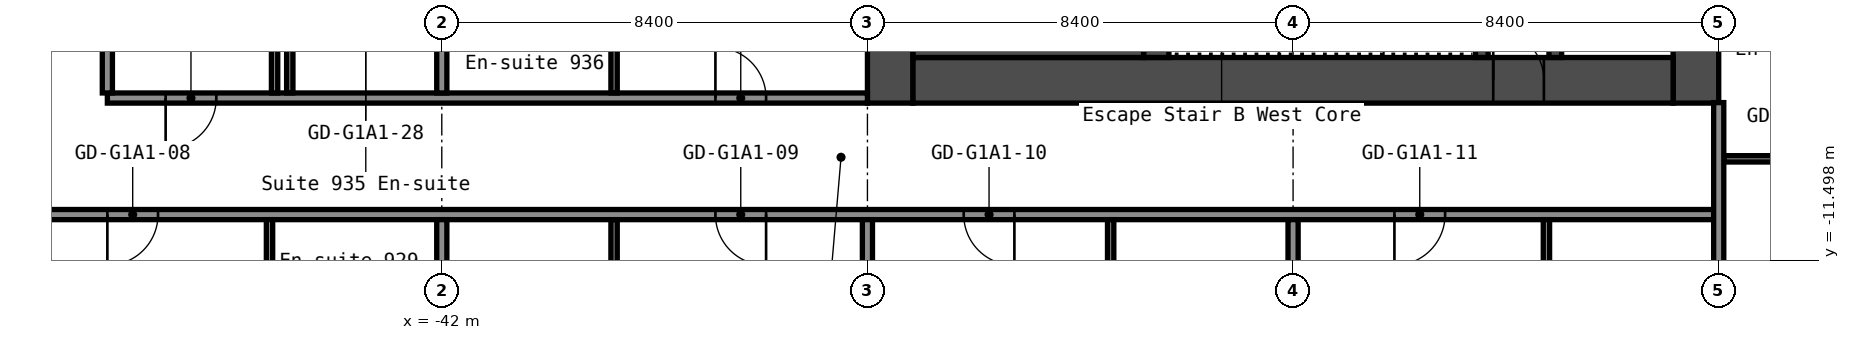
"""IFC4 building model, lengths in metres.
Left out: names, types, materials, properties, quantities, classifications, styles, units other than length and angle.
Written with IfcOpenShell. Run it as: python <this file> out.ifc"""

import sys

from ifc_helpers import new_model, si_unit, direction, frame, frame_2d, origin, place, context, subcontext, project, spatial, rectangle, extrude, element, fill, save


model = new_model("IFC4")
c1 = context("Model", 3, precision=1e-05, world=origin(), true_north=direction((0.0, 1.0)))
c2 = subcontext(c1, "Body", "Model", "MODEL_VIEW")
j1 = project(units=[si_unit("LENGTHUNIT", "METRE"), si_unit("PLANEANGLEUNIT", "RADIAN")], contexts=[c1])
p1 = place(None, origin())
s1 = spatial("IfcSite", under=j1, at=p1, CompositionType="ELEMENT")
p2 = place(p1, origin())
s2 = spatial("IfcBuilding", under=s1, at=p2, CompositionType="ELEMENT")
p3 = place(p2, frame((0.0, 0.0, 35.8)))
s3 = spatial("IfcBuildingStorey", under=s2, at=p3, CompositionType="ELEMENT", Elevation=35.8)
p4 = place(p3, frame((-17.25, -8.4, 0.0), z_axis=(0.0, 0.0, 1.0), x_axis=(0.0, 1.0, 0.0)))
e1 = element("IfcWall", 1, at=p4, inside=s3, PredefinedType="SHEAR", context=c2, shape_type="SweptSolid", body=[
    extrude(rectangle(XDim=16.8, YDim=0.9, at=frame_2d((8.4, 0.0))), origin(), (0.0, 0.0, 1.0), 2.8),
])
p5 = place(p4, frame((12.75, 0.0, 0.0)))
e2 = element("IfcOpeningElement", 2, at=p5, cuts=e1, PredefinedType="OPENING", context=c2, shape_type="SweptSolid", body=[
    extrude(rectangle(XDim=1.2, YDim=2.1, at=frame_2d((0.6, 1.05))), frame((0.0, 0.46, 0.0), z_axis=(0.0, -1.0, 0.0), x_axis=(1.0, 0.0, 0.0)), (0.0, 0.0, 1.0), 0.92),
])
p6 = place(p4, frame((2.85, 0.0, 0.0)))
e3 = element("IfcOpeningElement", 3, at=p6, cuts=e1, PredefinedType="OPENING", context=c2, shape_type="SweptSolid", body=[
    extrude(rectangle(XDim=1.2, YDim=2.1, at=frame_2d((0.6, 1.05))), frame((0.0, 0.46, 0.0), z_axis=(0.0, -1.0, 0.0), x_axis=(1.0, 0.0, 0.0)), (0.0, 0.0, 1.0), 0.92),
])
p7 = place(p3, frame((-33.15, -8.4, 0.0), z_axis=(0.0, 0.0, 1.0), x_axis=(0.0, 1.0, 0.0)))
e4 = element("IfcWall", 4, at=p7, inside=s3, PredefinedType="SHEAR", context=c2, shape_type="SweptSolid", body=[
    extrude(rectangle(XDim=16.8, YDim=0.9, at=frame_2d((8.4, 0.0))), origin(), (0.0, 0.0, 1.0), 2.8),
])
p8 = place(p3, frame((-32.7, -7.95, 0.0), z_axis=(0.0, 0.0, 1.0), x_axis=(1.0, 0.0, 0.0)))
e5 = element("IfcWall", 5, at=p8, inside=s3, PredefinedType="SHEAR", context=c2, shape_type="SweptSolid", body=[
    extrude(rectangle(XDim=15.0, YDim=0.9, at=frame_2d((7.5, 0.0))), origin(), (0.0, 0.0, 1.0), 2.8),
])
p9 = place(p8, frame((11.45, 0.0, 0.0)))
e6 = element("IfcOpeningElement", 6, at=p9, cuts=e5, PredefinedType="OPENING", context=c2, shape_type="SweptSolid", body=[
    extrude(rectangle(XDim=1.0, YDim=2.1, at=frame_2d((0.5, 1.05))), frame((0.0, 0.46, 0.0), z_axis=(0.0, -1.0, 0.0), x_axis=(1.0, 0.0, 0.0)), (0.0, 0.0, 1.0), 0.92),
])
p10 = place(p3, frame((-20.025, -7.5, 0.0), z_axis=(0.0, 0.0, 1.0), x_axis=(0.0, 1.0, 0.0)))
e7 = element("IfcWall", 7, at=p10, inside=s3, PredefinedType="SHEAR", context=c2, shape_type="SweptSolid", body=[
    extrude(rectangle(XDim=6.3, YDim=0.25, at=frame_2d((3.15, 0.0))), origin(), (0.0, 0.0, 1.0), 2.8),
])
p11 = place(p10, frame((2.4, 0.0, 0.0)))
e8 = element("IfcOpeningElement", 8, at=p11, cuts=e7, PredefinedType="OPENING", context=c2, shape_type="SweptSolid", body=[
    extrude(rectangle(XDim=1.0, YDim=2.1, at=frame_2d((0.5, 1.05))), frame((0.0, 0.135, 0.0), z_axis=(0.0, -1.0, 0.0), x_axis=(1.0, 0.0, 0.0)), (0.0, 0.0, 1.0), 0.27),
])
p12 = place(p3, frame((-21.475, -7.5, 0.0), z_axis=(0.0, 0.0, 1.0), x_axis=(0.0, 1.0, 0.0)))
e9 = element("IfcWall", 9, at=p12, inside=s3, PredefinedType="SHEAR", context=c2, shape_type="SweptSolid", body=[
    extrude(rectangle(XDim=3.75, YDim=0.25, at=frame_2d((1.875, 0.0))), origin(), (0.0, 0.0, 1.0), 2.8),
])
p13 = place(p12, frame((1.3, 0.0, 0.0)))
e10 = element("IfcOpeningElement", 10, at=p13, cuts=e9, PredefinedType="OPENING", context=c2, shape_type="SweptSolid", body=[
    extrude(rectangle(XDim=1.2, YDim=2.1, at=frame_2d((0.6, 1.05))), frame((0.0, 0.135, 0.0), z_axis=(0.0, -1.0, 0.0), x_axis=(1.0, 0.0, 0.0)), (0.0, 0.0, 1.0), 0.27),
])
p14 = place(p3, frame((-27.9, -7.5, 0.0), z_axis=(0.0, 0.0, 1.0), x_axis=(0.0, 1.0, 0.0)))
e11 = element("IfcWall", 11, at=p14, inside=s3, PredefinedType="SHEAR", context=c2, shape_type="SweptSolid", body=[
    extrude(rectangle(XDim=3.75, YDim=0.5, at=frame_2d((1.875, 0.0))), origin(), (0.0, 0.0, 1.0), 2.8),
])
p15 = place(p3, frame((-32.7, -6.75, 0.0), z_axis=(0.0, 0.0, 1.0), x_axis=(1.0, 0.0, 0.0)))
e12 = element("IfcWall", 12, at=p15, inside=s3, PredefinedType="SHEAR", context=c2, shape_type="SweptSolid", body=[
    extrude(rectangle(XDim=4.55, YDim=1.5, at=frame_2d((2.275, 0.0))), origin(), (0.0, 0.0, 1.0), 2.8),
])
p16 = place(p3, frame((-51.1, -10.6, 0.0), z_axis=(0.0, 0.0, 1.0), x_axis=(1.0, 0.0, 0.0)))
e13 = element("IfcWall", 13, at=p16, inside=s3, PredefinedType="PARTITIONING", context=c2, shape_type="SweptSolid", body=[
    extrude(rectangle(XDim=34.3, YDim=0.2, at=frame_2d((17.15, 0.0))), origin(), (0.0, 0.0, 1.0), 2.8),
])
p17 = place(p16, frame((2.5, 0.0, 0.0)))
e14 = element("IfcOpeningElement", 14, at=p17, cuts=e13, PredefinedType="OPENING", context=c2, shape_type="SweptSolid", body=[
    extrude(rectangle(XDim=1.0, YDim=2.1, at=frame_2d((0.5, 1.05))), frame((0.0, 0.11, 0.0), z_axis=(0.0, -1.0, 0.0), x_axis=(1.0, 0.0, 0.0)), (0.0, 0.0, 1.0), 0.22),
])
p18 = place(p16, frame((14.5, 0.0, 0.0)))
e15 = element("IfcOpeningElement", 15, at=p18, cuts=e13, PredefinedType="OPENING", context=c2, shape_type="SweptSolid", body=[
    extrude(rectangle(XDim=1.0, YDim=2.1, at=frame_2d((0.5, 1.05))), frame((0.0, 0.11, 0.0), z_axis=(0.0, -1.0, 0.0), x_axis=(1.0, 0.0, 0.0)), (0.0, 0.0, 1.0), 0.22),
])
p19 = place(p16, frame((19.4, 0.0, 0.0)))
e16 = element("IfcOpeningElement", 16, at=p19, cuts=e13, PredefinedType="OPENING", context=c2, shape_type="SweptSolid", body=[
    extrude(rectangle(XDim=1.0, YDim=2.1, at=frame_2d((0.5, 1.05))), frame((0.0, 0.11, 0.0), z_axis=(0.0, -1.0, 0.0), x_axis=(1.0, 0.0, 0.0)), (0.0, 0.0, 1.0), 0.22),
])
p20 = place(p16, frame((27.9, 0.0, 0.0)))
e17 = element("IfcOpeningElement", 17, at=p20, cuts=e13, PredefinedType="OPENING", context=c2, shape_type="SweptSolid", body=[
    extrude(rectangle(XDim=1.0, YDim=2.1, at=frame_2d((0.5, 1.05))), frame((0.0, 0.11, 0.0), z_axis=(0.0, -1.0, 0.0), x_axis=(1.0, 0.0, 0.0)), (0.0, 0.0, 1.0), 0.22),
])
p21 = place(p3, frame((-16.7, -9.5, 0.0), z_axis=(0.0, 0.0, 1.0), x_axis=(1.0, 0.0, 0.0)))
e18 = element("IfcWall", 18, at=p21, inside=s3, PredefinedType="PARTITIONING", context=c2, shape_type="SweptSolid", body=[
    extrude(rectangle(XDim=3.238, YDim=0.125, at=frame_2d((1.619, 0.0))), origin(), (0.0, 0.0, 1.0), 2.8),
])
p22 = place(p21, frame((1.2, 0.0, 0.0)))
e19 = element("IfcOpeningElement", 19, at=p22, cuts=e18, PredefinedType="OPENING", context=c2, shape_type="SweptSolid", body=[
    extrude(rectangle(XDim=0.8, YDim=2.1, at=frame_2d((0.4, 1.05))), frame((0.0, 0.073, 0.0), z_axis=(0.0, -1.0, 0.0), x_axis=(1.0, 0.0, 0.0)), (0.0, 0.0, 1.0), 0.145),
])
p23 = place(p3, frame((-48.6, -8.3, 0.0), z_axis=(0.0, 0.0, 1.0), x_axis=(1.0, 0.0, 0.0)))
e20 = element("IfcWall", 20, at=p23, inside=s3, PredefinedType="PARTITIONING", context=c2, shape_type="SweptSolid", body=[
    extrude(rectangle(XDim=15.0, YDim=0.2, at=frame_2d((7.5, 0.0))), origin(), (0.0, 0.0, 1.0), 2.8),
])
p24 = place(p23, frame((1.15, 0.0, 0.0)))
e21 = element("IfcOpeningElement", 21, at=p24, cuts=e20, PredefinedType="OPENING", context=c2, shape_type="SweptSolid", body=[
    extrude(rectangle(XDim=1.0, YDim=2.1, at=frame_2d((0.5, 1.05))), frame((0.0, 0.11, 0.0), z_axis=(0.0, -1.0, 0.0), x_axis=(1.0, 0.0, 0.0)), (0.0, 0.0, 1.0), 0.22),
])
p25 = place(p23, frame((12.0, 0.0, 0.0)))
e22 = element("IfcOpeningElement", 22, at=p25, cuts=e20, PredefinedType="OPENING", context=c2, shape_type="SweptSolid", body=[
    extrude(rectangle(XDim=1.0, YDim=2.1, at=frame_2d((0.5, 1.05))), frame((0.0, 0.11, 0.0), z_axis=(0.0, -1.0, 0.0), x_axis=(1.0, 0.0, 0.0)), (0.0, 0.0, 1.0), 0.22),
])
p26 = place(p3, frame((-48.6, -8.2, 0.0), z_axis=(0.0, 0.0, 1.0), x_axis=(0.0, 1.0, 0.0)))
e23 = element("IfcWall", 23, at=p26, inside=s3, PredefinedType="PARTITIONING", context=c2, shape_type="SweptSolid", body=[
    extrude(rectangle(XDim=16.4, YDim=0.2, at=frame_2d((8.2, 0.0))), origin(), (0.0, 0.0, 1.0), 2.8),
])
p27 = place(p3, frame((-45.4, -14.0, 0.0), z_axis=(0.0, 0.0, 1.0), x_axis=(0.0, 1.0, 0.0)))
e24 = element("IfcWall", 24, at=p27, inside=s3, PredefinedType="PARTITIONING", context=c2, shape_type="SweptSolid", body=[
    extrude(rectangle(XDim=3.3, YDim=0.125, at=frame_2d((1.65, 0.0))), origin(), (0.0, 0.0, 1.0), 2.8),
])
p28 = place(p3, frame((-45.3, -8.2, 0.0), z_axis=(0.0, 0.0, 1.0), x_axis=(0.0, 1.0, 0.0)))
e25 = element("IfcWall", 25, at=p28, inside=s3, PredefinedType="PARTITIONING", context=c2, shape_type="SweptSolid", body=[
    extrude(rectangle(XDim=8.1, YDim=0.125, at=frame_2d((4.05, 0.0))), origin(), (0.0, 0.0, 1.0), 2.8),
])
p29 = place(p28, frame((4.05, 0.0, 0.0)))
e26 = element("IfcOpeningElement", 26, at=p29, cuts=e25, PredefinedType="OPENING", context=c2, shape_type="SweptSolid", body=[
    extrude(rectangle(XDim=0.9, YDim=2.1, at=frame_2d((0.45, 1.05))), frame((0.0, 0.073, 0.0), z_axis=(0.0, -1.0, 0.0), x_axis=(1.0, 0.0, 0.0)), (0.0, 0.0, 1.0), 0.145),
])
p30 = place(p3, frame((-45.0, -8.2, 0.0), z_axis=(0.0, 0.0, 1.0), x_axis=(0.0, 1.0, 0.0)))
e27 = element("IfcWall", 27, at=p30, inside=s3, PredefinedType="PARTITIONING", context=c2, shape_type="SweptSolid", body=[
    extrude(rectangle(XDim=3.1, YDim=0.125, at=frame_2d((1.55, 0.0))), origin(), (0.0, 0.0, 1.0), 2.8),
])
p31 = place(p3, frame((-42.0, -20.3, 0.0), z_axis=(0.0, 0.0, 1.0), x_axis=(0.0, 1.0, 0.0)))
e28 = element("IfcWall", 28, at=p31, inside=s3, PredefinedType="PARTITIONING", context=c2, shape_type="SweptSolid", body=[
    extrude(rectangle(XDim=9.6, YDim=0.2, at=frame_2d((4.8, 0.0))), origin(), (0.0, 0.0, 1.0), 2.8),
])
p32 = place(p3, frame((-42.0, -8.2, 0.0), z_axis=(0.0, 0.0, 1.0), x_axis=(0.0, 1.0, 0.0)))
e29 = element("IfcWall", 29, at=p32, inside=s3, PredefinedType="PARTITIONING", context=c2, shape_type="SweptSolid", body=[
    extrude(rectangle(XDim=16.4, YDim=0.2, at=frame_2d((8.2, 0.0))), origin(), (0.0, 0.0, 1.0), 2.8),
])
for number, where, z_axis, x_axis in (
    (30, (-38.6, -14.0, 0.0), (0.0, 0.0, 1.0), (0.0, 1.0, 0.0)),
    (31, (-38.6, -8.2, 0.0), (0.0, 0.0, 1.0), (0.0, 1.0, 0.0)),
):
    element("IfcWall", number, at=place(p3, frame(where, z_axis=z_axis, x_axis=x_axis)), inside=s3, PredefinedType="PARTITIONING", context=c2, shape_type="SweptSolid", body=[
        extrude(rectangle(XDim=3.3, YDim=0.125, at=frame_2d((1.65, 0.0))), origin(), (0.0, 0.0, 1.0), 2.8),
    ])
p33 = place(p3, frame((-33.6, -20.3, 0.0), z_axis=(0.0, 0.0, 1.0), x_axis=(0.0, 1.0, 0.0)))
e32 = element("IfcWall", 32, at=p33, inside=s3, PredefinedType="PARTITIONING", context=c2, shape_type="SweptSolid", body=[
    extrude(rectangle(XDim=9.6, YDim=0.2, at=frame_2d((4.8, 0.0))), origin(), (0.0, 0.0, 1.0), 2.8),
])
p34 = place(p3, frame((-28.8, -14.0, 0.0), z_axis=(0.0, 0.0, 1.0), x_axis=(0.0, 1.0, 0.0)))
e33 = element("IfcWall", 33, at=p34, inside=s3, PredefinedType="PARTITIONING", context=c2, shape_type="SweptSolid", body=[
    extrude(rectangle(XDim=3.3, YDim=0.125, at=frame_2d((1.65, 0.0))), origin(), (0.0, 0.0, 1.0), 2.8),
])
p35 = place(p34, frame((1.2, 0.0, 0.0)))
e34 = element("IfcOpeningElement", 34, at=p35, cuts=e33, PredefinedType="OPENING", context=c2, shape_type="SweptSolid", body=[
    extrude(rectangle(XDim=1.0, YDim=2.1, at=frame_2d((0.5, 1.05))), frame((0.0, 0.073, 0.0), z_axis=(0.0, -1.0, 0.0), x_axis=(1.0, 0.0, 0.0)), (0.0, 0.0, 1.0), 0.145),
])
p36 = place(p3, frame((-25.2, -20.3, 0.0), z_axis=(0.0, 0.0, 1.0), x_axis=(0.0, 1.0, 0.0)))
e35 = element("IfcWall", 35, at=p36, inside=s3, PredefinedType="PARTITIONING", context=c2, shape_type="SweptSolid", body=[
    extrude(rectangle(XDim=9.6, YDim=0.2, at=frame_2d((4.8, 0.0))), origin(), (0.0, 0.0, 1.0), 2.8),
])
p37 = place(p3, frame((-20.2, -14.0, 0.0), z_axis=(0.0, 0.0, 1.0), x_axis=(0.0, 1.0, 0.0)))
e36 = element("IfcWall", 36, at=p37, inside=s3, PredefinedType="PARTITIONING", context=c2, shape_type="SweptSolid", body=[
    extrude(rectangle(XDim=3.3, YDim=0.125, at=frame_2d((1.65, 0.0))), origin(), (0.0, 0.0, 1.0), 2.8),
])
p38 = place(p3, frame((-16.8, -20.3, 0.0), z_axis=(0.0, 0.0, 1.0), x_axis=(0.0, 1.0, 0.0)))
e37 = element("IfcWall", 37, at=p38, inside=s3, PredefinedType="PARTITIONING", context=c2, shape_type="SweptSolid", body=[
    extrude(rectangle(XDim=11.91, YDim=0.2, at=frame_2d((5.955, 0.0))), origin(), (0.0, 0.0, 1.0), 2.8),
])
p39 = place(p9, origin())
e38 = element("IfcDoor", 38, at=p39, inside=s3, OperationType="SINGLE_SWING_RIGHT", PredefinedType="DOOR", context=c2, shape_type="SweptSolid", body=[
    extrude(rectangle(XDim=1.0, YDim=2.1, at=frame_2d((0.5, 1.05))), frame((0.0, 0.025, 0.0), z_axis=(0.0, -1.0, 0.0), x_axis=(1.0, 0.0, 0.0)), (0.0, 0.0, 1.0), 0.05),
])
fill(e6, e38)
p40 = place(p17, origin())
e39 = element("IfcDoor", 39, at=p40, inside=s3, OperationType="SINGLE_SWING_LEFT", PredefinedType="DOOR", context=c2, shape_type="SweptSolid", body=[
    extrude(rectangle(XDim=1.0, YDim=2.1, at=frame_2d((0.5, 1.05))), frame((0.0, 0.025, 0.0), z_axis=(0.0, -1.0, 0.0), x_axis=(1.0, 0.0, 0.0)), (0.0, 0.0, 1.0), 0.05),
])
fill(e14, e39)
p41 = place(p18, origin())
e40 = element("IfcDoor", 40, at=p41, inside=s3, OperationType="SINGLE_SWING_RIGHT", PredefinedType="DOOR", context=c2, shape_type="SweptSolid", body=[
    extrude(rectangle(XDim=1.0, YDim=2.1, at=frame_2d((0.5, 1.05))), frame((0.0, 0.025, 0.0), z_axis=(0.0, -1.0, 0.0), x_axis=(1.0, 0.0, 0.0)), (0.0, 0.0, 1.0), 0.05),
])
fill(e15, e40)
p42 = place(p19, origin())
e41 = element("IfcDoor", 41, at=p42, inside=s3, OperationType="SINGLE_SWING_RIGHT", PredefinedType="DOOR", context=c2, shape_type="SweptSolid", body=[
    extrude(rectangle(XDim=1.0, YDim=2.1, at=frame_2d((0.5, 1.05))), frame((0.0, 0.025, 0.0), z_axis=(0.0, -1.0, 0.0), x_axis=(1.0, 0.0, 0.0)), (0.0, 0.0, 1.0), 0.05),
])
fill(e16, e41)
p43 = place(p20, origin())
e42 = element("IfcDoor", 42, at=p43, inside=s3, OperationType="SINGLE_SWING_LEFT", PredefinedType="DOOR", context=c2, shape_type="SweptSolid", body=[
    extrude(rectangle(XDim=1.0, YDim=2.1, at=frame_2d((0.5, 1.05))), frame((0.0, 0.025, 0.0), z_axis=(0.0, -1.0, 0.0), x_axis=(1.0, 0.0, 0.0)), (0.0, 0.0, 1.0), 0.05),
])
fill(e17, e42)
p44 = place(p24, origin())
e43 = element("IfcDoor", 43, at=p44, inside=s3, OperationType="SINGLE_SWING_LEFT", PredefinedType="DOOR", context=c2, shape_type="SweptSolid", body=[
    extrude(rectangle(XDim=1.0, YDim=2.1, at=frame_2d((0.5, 1.05))), frame((0.0, 0.025, 0.0), z_axis=(0.0, -1.0, 0.0), x_axis=(1.0, 0.0, 0.0)), (0.0, 0.0, 1.0), 0.05),
])
fill(e21, e43)
p45 = place(p25, origin())
e44 = element("IfcDoor", 44, at=p45, inside=s3, OperationType="SINGLE_SWING_RIGHT", PredefinedType="DOOR", context=c2, shape_type="SweptSolid", body=[
    extrude(rectangle(XDim=1.0, YDim=2.1, at=frame_2d((0.5, 1.05))), frame((0.0, 0.025, 0.0), z_axis=(0.0, -1.0, 0.0), x_axis=(1.0, 0.0, 0.0)), (0.0, 0.0, 1.0), 0.05),
])
fill(e22, e44)
save(model, sys.argv[1])
